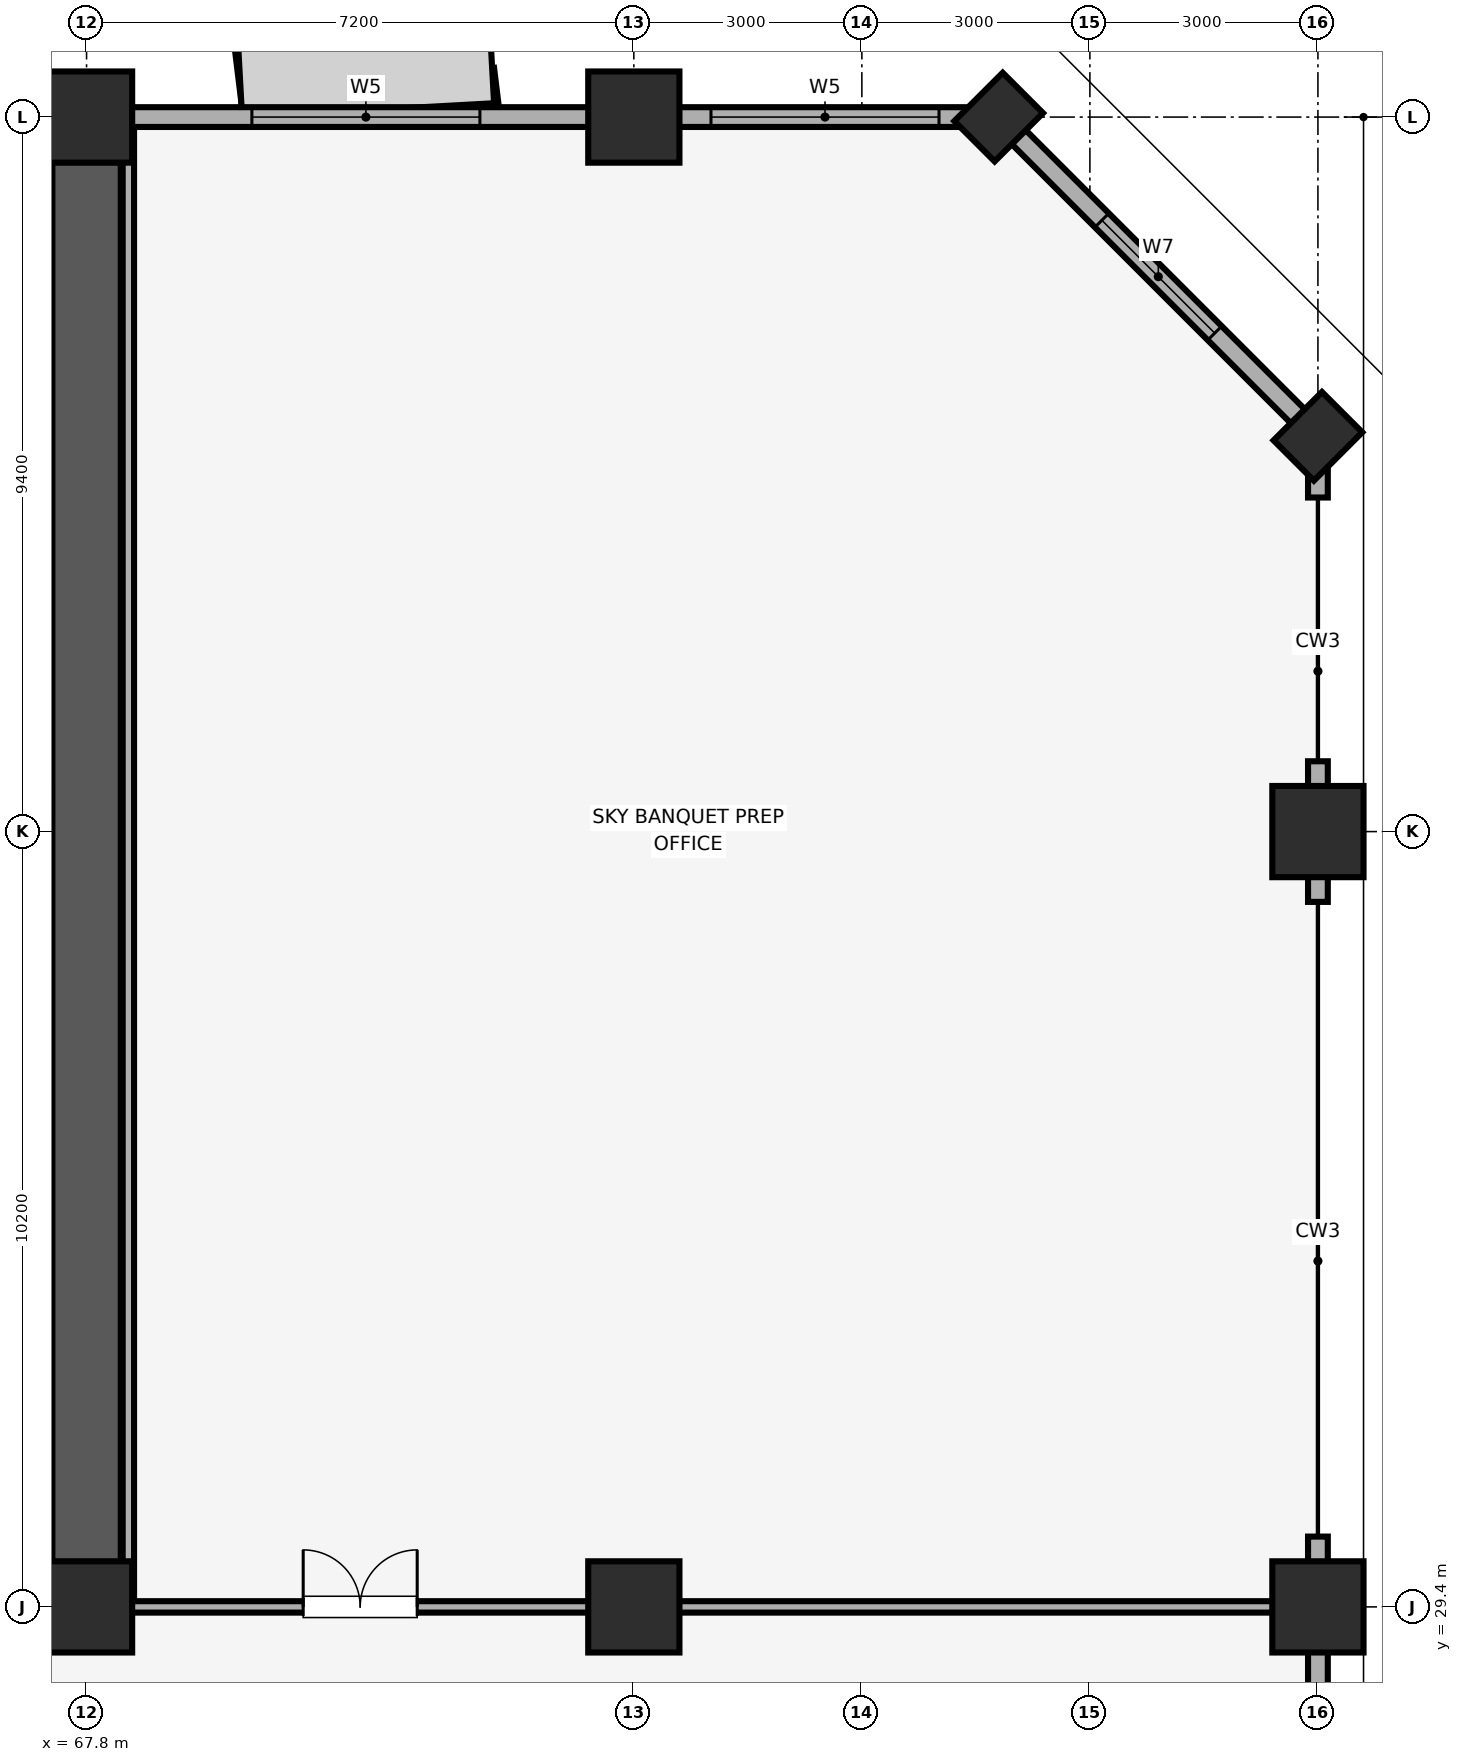
"""IFC4 building model, lengths in metres.
Left out: names, types, materials, properties, quantities, classifications, styles, units other than length and angle.
Written with IfcOpenShell. Run it as: python <this file> out.ifc"""

import sys

from ifc_helpers import new_model, si_unit, direction, frame, frame_2d, origin, origin_2d, place, context, subcontext, project, spatial, rectangle, extrude, element, fill, save


model = new_model("IFC4")
c1 = context("Model", 3, precision=1e-05, world=origin(), true_north=direction((0.0, 1.0)))
c2 = subcontext(c1, "Body", "Model", "MODEL_VIEW")
j1 = project(units=[si_unit("LENGTHUNIT", "METRE"), si_unit("PLANEANGLEUNIT", "RADIAN")], contexts=[c1])
p1 = place(None, origin())
s1 = spatial("IfcSite", under=j1, at=p1, CompositionType="ELEMENT")
p2 = place(p1, origin())
s2 = spatial("IfcBuilding", under=s1, at=p2, CompositionType="ELEMENT")
p3 = place(p2, frame((0.0, 0.0, 130.55)))
s3 = spatial("IfcBuildingStorey", under=s2, at=p3, CompositionType="ELEMENT", Elevation=130.55)
for number, where, z_axis, x_axis in (
    (1, (84.0, 29.4, 0.0), (0.0, 0.0, 1.0), (1.0, 0.0, 0.0)),
    (2, (84.0, 39.6, 0.0), (0.0, 0.0, 1.0), (1.0, 0.0, 0.0)),
):
    element("IfcColumn", number, at=place(p3, frame(where, z_axis=z_axis, x_axis=x_axis)), inside=s3, PredefinedType="COLUMN", context=c2, shape_type="SweptSolid", body=[
        extrude(rectangle(XDim=1.2, YDim=1.2, at=origin_2d()), origin(), (0.0, 0.0, 1.0), 4.56),
    ])
for number, where, z_axis, x_axis in (
    (3, (84.0, 44.8, 0.0), (0.0, 0.0, 1.0), (0.707, 0.707, 0.0)),
    (4, (79.8, 49.0, 0.0), (0.0, 0.0, 1.0), (0.707, 0.707, 0.0)),
):
    element("IfcColumn", number, at=place(p3, frame(where, z_axis=z_axis, x_axis=x_axis)), inside=s3, PredefinedType="PILASTER", context=c2, shape_type="SweptSolid", body=[
        extrude(rectangle(XDim=0.9, YDim=0.75, at=origin_2d()), origin(), (0.0, 0.0, 1.0), 4.56),
    ])
for number, where, z_axis, x_axis in (
    (5, (67.8, 29.4, 0.0), (0.0, 0.0, 1.0), (1.0, 0.0, 0.0)),
    (6, (67.8, 49.0, 0.0), (0.0, 0.0, 1.0), (1.0, 0.0, 0.0)),
    (7, (75.0, 29.4, 0.0), (0.0, 0.0, 1.0), (1.0, 0.0, 0.0)),
    (8, (75.0, 49.0, 0.0), (0.0, 0.0, 1.0), (1.0, 0.0, 0.0)),
):
    element("IfcColumn", number, at=place(p3, frame(where, z_axis=z_axis, x_axis=x_axis)), inside=s3, PredefinedType="COLUMN", context=c2, shape_type="SweptSolid", body=[
        extrude(rectangle(XDim=1.2, YDim=1.2, at=origin_2d()), origin(), (0.0, 0.0, 1.0), 4.56),
    ])
p4 = place(p3, frame((84.0, 26.475, 0.0), z_axis=(0.0, 0.0, 1.0), x_axis=(0.0, 1.0, 0.0)))
e9 = element("IfcWall", 9, at=p4, inside=s3, PredefinedType="SOLIDWALL", context=c2, shape_type="SweptSolid", body=[
    extrude(rectangle(XDim=3.85, YDim=0.26, at=frame_2d((1.925, 0.0))), origin(), (0.0, 0.0, 1.0), 4.52),
])
p5 = place(p3, frame((84.0, 38.675, 0.0), z_axis=(0.0, 0.0, 1.0), x_axis=(0.0, 1.0, 0.0)))
e10 = element("IfcWall", 10, at=p5, inside=s3, PredefinedType="SOLIDWALL", context=c2, shape_type="SweptSolid", body=[
    extrude(rectangle(XDim=1.85, YDim=0.26, at=frame_2d((0.925, 0.0))), origin(), (0.0, 0.0, 1.0), 4.52),
])
p6 = place(p3, frame((84.0, 43.995, 0.0), z_axis=(0.0, 0.0, 1.0), x_axis=(0.0, 1.0, 0.0)))
e11 = element("IfcWall", 11, at=p6, inside=s3, PredefinedType="SOLIDWALL", context=c2, shape_type="SweptSolid", body=[
    extrude(rectangle(XDim=0.805, YDim=0.26, at=frame_2d((0.402, 0.0))), origin(), (0.0, 0.0, 1.0), 4.52),
])
p7 = place(p3, frame((84.0, 44.8, 0.0), z_axis=(0.0, 0.0, 1.0), x_axis=(-0.707106781187, 0.707106781187, 0.0)))
e12 = element("IfcWall", 12, at=p7, inside=s3, PredefinedType="SOLIDWALL", context=c2, shape_type="SweptSolid", body=[
    extrude(rectangle(XDim=5.94, YDim=0.26, at=frame_2d((2.97, 0.0))), origin(), (0.0, 0.0, 1.0), 4.52),
])
p8 = place(p7, frame((1.92, 0.0, 0.85)))
e13 = element("IfcOpeningElement", 13, at=p8, cuts=e12, PredefinedType="OPENING", context=c2, shape_type="SweptSolid", body=[
    extrude(rectangle(XDim=2.1, YDim=1.6, at=frame_2d((1.05, 0.8))), frame((0.0, 0.14, 0.0), z_axis=(0.0, -1.0, 0.0), x_axis=(1.0, 0.0, 0.0)), (0.0, 0.0, 1.0), 0.28),
])
p9 = place(p3, frame((79.8, 49.0, 0.0), z_axis=(0.0, 0.0, 1.0), x_axis=(-1.0, 0.0, 0.0)))
e14 = element("IfcWall", 14, at=p9, inside=s3, PredefinedType="SOLIDWALL", context=c2, shape_type="SweptSolid", body=[
    extrude(rectangle(XDim=75.6, YDim=0.26, at=frame_2d((37.8, 0.0))), origin(), (0.0, 0.0, 1.0), 3.4),
])
p10 = place(p9, frame((71.815, 0.0, 0.85)))
e15 = element("IfcOpeningElement", 15, at=p10, cuts=e14, PredefinedType="OPENING", context=c2, shape_type="SweptSolid", body=[
    extrude(rectangle(XDim=3.0, YDim=1.5, at=frame_2d((1.5, 0.75))), frame((0.0, 0.14, 0.0), z_axis=(0.0, -1.0, 0.0), x_axis=(1.0, 0.0, 0.0)), (0.0, 0.0, 1.0), 0.28),
])
p11 = place(p9, frame((65.775, 0.0, 0.85)))
e16 = element("IfcOpeningElement", 16, at=p11, cuts=e14, PredefinedType="OPENING", context=c2, shape_type="SweptSolid", body=[
    extrude(rectangle(XDim=3.0, YDim=1.5, at=frame_2d((1.5, 0.75))), frame((0.0, 0.14, 0.0), z_axis=(0.0, -1.0, 0.0), x_axis=(1.0, 0.0, 0.0)), (0.0, 0.0, 1.0), 0.28),
])
p12 = place(p9, frame((6.825, 0.0, 0.85)))
e17 = element("IfcOpeningElement", 17, at=p12, cuts=e14, PredefinedType="OPENING", context=c2, shape_type="SweptSolid", body=[
    extrude(rectangle(XDim=3.0, YDim=1.5, at=frame_2d((1.5, 0.75))), frame((0.0, 0.14, 0.0), z_axis=(0.0, -1.0, 0.0), x_axis=(1.0, 0.0, 0.0)), (0.0, 0.0, 1.0), 0.28),
])
p13 = place(p9, frame((0.785, 0.0, 0.85)))
e18 = element("IfcOpeningElement", 18, at=p13, cuts=e14, PredefinedType="OPENING", context=c2, shape_type="SweptSolid", body=[
    extrude(rectangle(XDim=3.0, YDim=1.5, at=frame_2d((1.5, 0.75))), frame((0.0, 0.14, 0.0), z_axis=(0.0, -1.0, 0.0), x_axis=(1.0, 0.0, 0.0)), (0.0, 0.0, 1.0), 0.28),
])
p14 = place(p9, frame((50.315, 0.0, 0.9)))
e19 = element("IfcOpeningElement", 19, at=p14, cuts=e14, PredefinedType="OPENING", context=c2, shape_type="SweptSolid", body=[
    extrude(rectangle(XDim=3.6, YDim=1.5, at=frame_2d((1.8, 0.75))), frame((0.0, 0.14, 0.0), z_axis=(0.0, -1.0, 0.0), x_axis=(1.0, 0.0, 0.0)), (0.0, 0.0, 1.0), 0.28),
])
p15 = place(p9, frame((45.25, 0.0, 0.9)))
e20 = element("IfcOpeningElement", 20, at=p15, cuts=e14, PredefinedType="OPENING", context=c2, shape_type="SweptSolid", body=[
    extrude(rectangle(XDim=3.0, YDim=1.5, at=frame_2d((1.5, 0.75))), frame((0.0, 0.14, 0.0), z_axis=(0.0, -1.0, 0.0), x_axis=(1.0, 0.0, 0.0)), (0.0, 0.0, 1.0), 0.28),
])
p16 = place(p9, frame((28.1, 0.0, 0.9)))
e21 = element("IfcOpeningElement", 21, at=p16, cuts=e14, PredefinedType="OPENING", context=c2, shape_type="SweptSolid", body=[
    extrude(rectangle(XDim=3.6, YDim=1.5, at=frame_2d((1.8, 0.75))), frame((0.0, 0.14, 0.0), z_axis=(0.0, -1.0, 0.0), x_axis=(1.0, 0.0, 0.0)), (0.0, 0.0, 1.0), 0.28),
])
p17 = place(p9, frame((23.035, 0.0, 0.9)))
e22 = element("IfcOpeningElement", 22, at=p17, cuts=e14, PredefinedType="OPENING", context=c2, shape_type="SweptSolid", body=[
    extrude(rectangle(XDim=2.4, YDim=1.5, at=frame_2d((1.2, 0.75))), frame((0.0, 0.14, 0.0), z_axis=(0.0, -1.0, 0.0), x_axis=(1.0, 0.0, 0.0)), (0.0, 0.0, 1.0), 0.28),
])
p18 = place(p3, frame((67.8, 29.4, 0.0), z_axis=(0.0, 0.0, 1.0), x_axis=(0.0, 1.0, 0.0)))
e23 = element("IfcWall", 23, at=p18, inside=s3, PredefinedType="SHEAR", context=c2, shape_type="SweptSolid", body=[
    extrude(rectangle(XDim=19.2, YDim=0.9, at=frame_2d((9.6, 0.0))), origin(), (0.0, 0.0, 1.0), 4.52),
])
p19 = place(p3, frame((68.35, 29.4, 0.0), z_axis=(0.0, 0.0, 1.0), x_axis=(1.0, 0.0, 0.0)))
e24 = element("IfcWall", 24, at=p19, inside=s3, PredefinedType="PARTITIONING", context=c2, shape_type="SweptSolid", body=[
    extrude(rectangle(XDim=15.5, YDim=0.15, at=frame_2d((7.75, 0.0))), origin(), (0.0, 0.0, 1.0), 3.4),
])
p20 = place(p19, frame((2.3, 0.0, 0.0)))
e25 = element("IfcOpeningElement", 25, at=p20, cuts=e24, PredefinedType="OPENING", context=c2, shape_type="SweptSolid", body=[
    extrude(rectangle(XDim=1.5, YDim=2.25, at=frame_2d((0.75, 1.125))), frame((0.0, 0.085, 0.0), z_axis=(0.0, -1.0, 0.0), x_axis=(1.0, 0.0, 0.0)), (0.0, 0.0, 1.0), 0.17),
])
p21 = place(p3, frame((68.35, 29.48, 0.0), z_axis=(0.0, 0.0, 1.0), x_axis=(0.0, 1.0, 0.0)))
e26 = element("IfcWall", 26, at=p21, inside=s3, PredefinedType="PARTITIONING", context=c2, shape_type="SweptSolid", body=[
    extrude(rectangle(XDim=19.37, YDim=0.15, at=frame_2d((9.685, 0.0))), origin(), (0.0, 0.0, 1.0), 4.52),
])
p22 = place(p8, origin())
e27 = element("IfcWindow", 27, at=p22, inside=s3, PartitioningType="SINGLE_PANEL", PredefinedType="WINDOW", context=c2, shape_type="SweptSolid", body=[
    extrude(rectangle(XDim=2.1, YDim=1.6, at=frame_2d((1.05, 0.8))), frame((0.0, 0.03, 0.0), z_axis=(0.0, -1.0, 0.0), x_axis=(1.0, 0.0, 0.0)), (0.0, 0.0, 1.0), 0.06),
])
fill(e13, e27)
p23 = place(p12, origin())
e28 = element("IfcWindow", 28, at=p23, inside=s3, PartitioningType="SINGLE_PANEL", PredefinedType="WINDOW", context=c2, shape_type="SweptSolid", body=[
    extrude(rectangle(XDim=3.0, YDim=1.5, at=frame_2d((1.5, 0.75))), frame((0.0, 0.03, 0.0), z_axis=(0.0, -1.0, 0.0), x_axis=(1.0, 0.0, 0.0)), (0.0, 0.0, 1.0), 0.06),
])
fill(e17, e28)
p24 = place(p13, origin())
e29 = element("IfcWindow", 29, at=p24, inside=s3, PartitioningType="SINGLE_PANEL", PredefinedType="WINDOW", context=c2, shape_type="SweptSolid", body=[
    extrude(rectangle(XDim=3.0, YDim=1.5, at=frame_2d((1.5, 0.75))), frame((0.0, 0.03, 0.0), z_axis=(0.0, -1.0, 0.0), x_axis=(1.0, 0.0, 0.0)), (0.0, 0.0, 1.0), 0.06),
])
fill(e18, e29)
p25 = place(p20, origin())
e30 = element("IfcDoor", 30, at=p25, inside=s3, OperationType="DOUBLE_DOOR_SINGLE_SWING", PredefinedType="DOOR", context=c2, shape_type="SweptSolid", body=[
    extrude(rectangle(XDim=1.5, YDim=2.25, at=frame_2d((0.75, 1.125))), frame((0.0, 0.025, 0.0), z_axis=(0.0, -1.0, 0.0), x_axis=(1.0, 0.0, 0.0)), (0.0, 0.0, 1.0), 0.05),
])
fill(e25, e30)
save(model, sys.argv[1])
